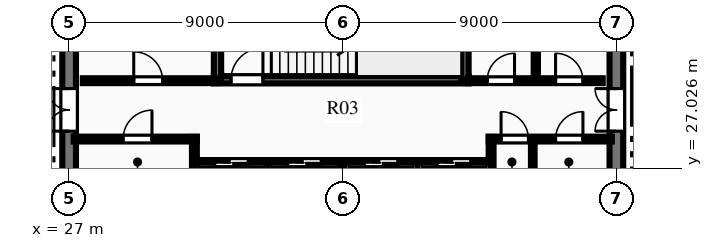
"""IFC4 building model, lengths in metres.
Left out: names, types, materials, properties, quantities, classifications, styles, units other than length and angle.
Written with IfcOpenShell. Run it as: python <this file> out.ifc"""

import sys

from ifc_helpers import new_model, si_unit, direction, frame, frame_2d, origin, place, context, subcontext, project, spatial, rectangle, extrude, element, fill, save


model = new_model("IFC4")
c1 = context("Model", 3, precision=1e-05, world=origin(), true_north=direction((0.0, 1.0)))
c2 = subcontext(c1, "Body", "Model", "MODEL_VIEW")
j1 = project(units=[si_unit("LENGTHUNIT", "METRE"), si_unit("PLANEANGLEUNIT", "RADIAN")], contexts=[c1])
p1 = place(None, origin())
s1 = spatial("IfcSite", under=j1, at=p1, CompositionType="ELEMENT")
p2 = place(p1, origin())
s2 = spatial("IfcBuilding", under=s1, at=p2, CompositionType="ELEMENT")
p3 = place(p2, frame((0.0, 0.0, 263.7)))
s3 = spatial("IfcBuildingStorey", under=s2, at=p3, CompositionType="ELEMENT", Elevation=263.7)
p4 = place(p3, frame((27.0, 18.225, 0.0), z_axis=(0.0, 0.0, 1.0), x_axis=(0.0, 1.0, 0.0)))
e1 = element("IfcWall", 1, at=p4, inside=s3, PredefinedType="SHEAR", context=c2, shape_type="SweptSolid", body=[
    extrude(rectangle(XDim=15.55, YDim=0.45, at=frame_2d((7.775, 0.0))), origin(), (0.0, 0.0, 1.0), 3.75),
])
p5 = place(p4, frame((10.015, 0.0, 0.0)))
e2 = element("IfcOpeningElement", 2, at=p5, cuts=e1, PredefinedType="OPENING", context=c2, shape_type="SweptSolid", body=[
    extrude(rectangle(XDim=1.4, YDim=2.2, at=frame_2d((0.7, 1.1))), frame((0.0, 0.235, 0.0), z_axis=(0.0, -1.0, 0.0), x_axis=(1.0, 0.0, 0.0)), (0.0, 0.0, 1.0), 0.47),
])
p6 = place(p3, frame((45.0, 18.225, 0.0), z_axis=(0.0, 0.0, 1.0), x_axis=(0.0, 1.0, 0.0)))
e3 = element("IfcWall", 3, at=p6, inside=s3, PredefinedType="SHEAR", context=c2, shape_type="SweptSolid", body=[
    extrude(rectangle(XDim=15.55, YDim=0.45, at=frame_2d((7.775, 0.0))), origin(), (0.0, 0.0, 1.0), 3.75),
])
p7 = place(p6, frame((10.015, 0.0, 0.0)))
e4 = element("IfcOpeningElement", 4, at=p7, cuts=e3, PredefinedType="OPENING", context=c2, shape_type="SweptSolid", body=[
    extrude(rectangle(XDim=1.4, YDim=2.2, at=frame_2d((0.7, 1.1))), frame((0.0, 0.235, 0.0), z_axis=(0.0, -1.0, 0.0), x_axis=(1.0, 0.0, 0.0)), (0.0, 0.0, 1.0), 0.47),
])
p8 = place(p3, frame((31.76, 29.93, 0.0), z_axis=(0.0, 0.0, 1.0), x_axis=(1.0, 0.0, 0.0)))
e5 = element("IfcWall", 5, at=p8, inside=s3, PredefinedType="SHEAR", context=c2, shape_type="SweptSolid", body=[
    extrude(rectangle(XDim=8.38, YDim=0.24, at=frame_2d((4.19, 0.0))), origin(), (0.0, 0.0, 1.0), 3.75),
])
p9 = place(p8, frame((0.565, 0.0, 0.0)))
e6 = element("IfcOpeningElement", 6, at=p9, cuts=e5, PredefinedType="OPENING", context=c2, shape_type="SweptSolid", body=[
    extrude(rectangle(XDim=1.05, YDim=2.15, at=frame_2d((0.525, 1.075))), frame((0.0, 0.13, 0.0), z_axis=(0.0, -1.0, 0.0), x_axis=(1.0, 0.0, 0.0)), (0.0, 0.0, 1.0), 0.26),
])
p10 = place(p3, frame((31.88, 29.93, 0.0), z_axis=(0.0, 0.0, 1.0), x_axis=(0.0, 1.0, 0.0)))
e7 = element("IfcWall", 7, at=p10, inside=s3, PredefinedType="SHEAR", context=c2, shape_type="SweptSolid", body=[
    extrude(rectangle(XDim=3.79, YDim=0.24, at=frame_2d((1.895, 0.0))), origin(), (0.0, 0.0, 1.0), 3.75),
])
p11 = place(p3, frame((40.02, 29.93, 0.0), z_axis=(0.0, 0.0, 1.0), x_axis=(0.0, 1.0, 0.0)))
e8 = element("IfcWall", 8, at=p11, inside=s3, PredefinedType="SHEAR", context=c2, shape_type="SweptSolid", body=[
    extrude(rectangle(XDim=3.85, YDim=0.24, at=frame_2d((1.925, 0.0))), origin(), (0.0, 0.0, 1.0), 3.75),
])
p12 = place(p3, frame((27.15, 27.98, 0.0), z_axis=(0.0, 0.0, 1.0), x_axis=(1.0, 0.0, 0.0)))
e9 = element("IfcWall", 9, at=p12, inside=s3, PredefinedType="PARTITIONING", context=c2, shape_type="SweptSolid", body=[
    extrude(rectangle(XDim=4.05, YDim=0.16, at=frame_2d((2.025, 0.0))), origin(), (0.0, 0.0, 1.0), 3.48),
])
p13 = place(p12, frame((1.625, 0.0, 0.0)))
e10 = element("IfcOpeningElement", 10, at=p13, cuts=e9, PredefinedType="OPENING", context=c2, shape_type="SweptSolid", body=[
    extrude(rectangle(XDim=0.95, YDim=2.15, at=frame_2d((0.475, 1.075))), frame((0.0, 0.09, 0.0), z_axis=(0.0, -1.0, 0.0), x_axis=(1.0, 0.0, 0.0)), (0.0, 0.0, 1.0), 0.18),
])
p14 = place(p3, frame((31.12, 26.54, 0.0), z_axis=(0.0, 0.0, 1.0), x_axis=(0.0, 1.0, 0.0)))
e11 = element("IfcWall", 11, at=p14, inside=s3, PredefinedType="PARTITIONING", context=c2, shape_type="SweptSolid", body=[
    extrude(rectangle(XDim=1.51, YDim=0.16, at=frame_2d((0.755, 0.0))), origin(), (0.0, 0.0, 1.0), 3.48),
])
p15 = place(p3, frame((40.8, 27.98, 0.0), z_axis=(0.0, 0.0, 1.0), x_axis=(1.0, 0.0, 0.0)))
e12 = element("IfcWall", 12, at=p15, inside=s3, PredefinedType="PARTITIONING", context=c2, shape_type="SweptSolid", body=[
    extrude(rectangle(XDim=4.05, YDim=0.16, at=frame_2d((2.025, 0.0))), origin(), (0.0, 0.0, 1.0), 3.48),
])
p16 = place(p15, frame((0.407, 0.0, 0.0)))
e13 = element("IfcOpeningElement", 13, at=p16, cuts=e12, PredefinedType="OPENING", context=c2, shape_type="SweptSolid", body=[
    extrude(rectangle(XDim=0.9, YDim=2.15, at=frame_2d((0.45, 1.075))), frame((0.0, 0.09, 0.0), z_axis=(0.0, -1.0, 0.0), x_axis=(1.0, 0.0, 0.0)), (0.0, 0.0, 1.0), 0.18),
])
p17 = place(p15, frame((2.2, 0.0, 0.0)))
e14 = element("IfcOpeningElement", 14, at=p17, cuts=e12, PredefinedType="OPENING", context=c2, shape_type="SweptSolid", body=[
    extrude(rectangle(XDim=0.9, YDim=2.15, at=frame_2d((0.45, 1.075))), frame((0.0, 0.09, 0.0), z_axis=(0.0, -1.0, 0.0), x_axis=(1.0, 0.0, 0.0)), (0.0, 0.0, 1.0), 0.18),
])
p18 = place(p3, frame((40.88, 26.54, 0.0), z_axis=(0.0, 0.0, 1.0), x_axis=(0.0, 1.0, 0.0)))
e15 = element("IfcWall", 15, at=p18, inside=s3, PredefinedType="PARTITIONING", context=c2, shape_type="SweptSolid", body=[
    extrude(rectangle(XDim=1.51, YDim=0.16, at=frame_2d((0.755, 0.0))), origin(), (0.0, 0.0, 1.0), 3.48),
])
p19 = place(p3, frame((42.25, 26.54, 0.0), z_axis=(0.0, 0.0, 1.0), x_axis=(0.0, 1.0, 0.0)))
e16 = element("IfcWall", 16, at=p19, inside=s3, PredefinedType="PARTITIONING", context=c2, shape_type="SweptSolid", body=[
    extrude(rectangle(XDim=1.44, YDim=0.12, at=frame_2d((0.72, 0.0))), origin(), (0.0, 0.0, 1.0), 3.48),
])
p20 = place(p3, frame((27.45, 29.9, 0.0), z_axis=(0.0, 0.0, 1.0), x_axis=(1.0, 0.0, 0.0)))
e17 = element("IfcWall", 17, at=p20, inside=s3, PredefinedType="PARTITIONING", context=c2, shape_type="SweptSolid", body=[
    extrude(rectangle(XDim=4.43, YDim=0.16, at=frame_2d((2.215, 0.0))), origin(), (0.0, 0.0, 1.0), 3.48),
])
p21 = place(p20, frame((1.675, 0.0, 0.0)))
e18 = element("IfcOpeningElement", 18, at=p21, cuts=e17, PredefinedType="OPENING", context=c2, shape_type="SweptSolid", body=[
    extrude(rectangle(XDim=0.95, YDim=2.15, at=frame_2d((0.475, 1.075))), frame((0.0, 0.09, 0.0), z_axis=(0.0, -1.0, 0.0), x_axis=(1.0, 0.0, 0.0)), (0.0, 0.0, 1.0), 0.18),
])
p22 = place(p3, frame((40.12, 29.9, 0.0), z_axis=(0.0, 0.0, 1.0), x_axis=(1.0, 0.0, 0.0)))
e19 = element("IfcWall", 19, at=p22, inside=s3, PredefinedType="PARTITIONING", context=c2, shape_type="SweptSolid", body=[
    extrude(rectangle(XDim=4.43, YDim=0.16, at=frame_2d((2.215, 0.0))), origin(), (0.0, 0.0, 1.0), 3.48),
])
p23 = place(p22, frame((0.63, 0.0, 0.0)))
e20 = element("IfcOpeningElement", 20, at=p23, cuts=e19, PredefinedType="OPENING", context=c2, shape_type="SweptSolid", body=[
    extrude(rectangle(XDim=0.9, YDim=2.15, at=frame_2d((0.45, 1.075))), frame((0.0, 0.09, 0.0), z_axis=(0.0, -1.0, 0.0), x_axis=(1.0, 0.0, 0.0)), (0.0, 0.0, 1.0), 0.18),
])
p24 = place(p22, frame((2.88, 0.0, 0.0)))
e21 = element("IfcOpeningElement", 21, at=p24, cuts=e19, PredefinedType="OPENING", context=c2, shape_type="SweptSolid", body=[
    extrude(rectangle(XDim=0.9, YDim=2.15, at=frame_2d((0.45, 1.075))), frame((0.0, 0.09, 0.0), z_axis=(0.0, -1.0, 0.0), x_axis=(1.0, 0.0, 0.0)), (0.0, 0.0, 1.0), 0.18),
])
p25 = place(p3, frame((42.35, 29.95, 0.0), z_axis=(0.0, 0.0, 1.0), x_axis=(0.0, 1.0, 0.0)))
e22 = element("IfcWall", 22, at=p25, inside=s3, PredefinedType="PARTITIONING", context=c2, shape_type="SweptSolid", body=[
    extrude(rectangle(XDim=3.6, YDim=0.14, at=frame_2d((1.8, 0.0))), origin(), (0.0, 0.0, 1.0), 3.48),
])
p26 = place(p3, frame((31.2, 27.2, 0.0), z_axis=(0.0, 0.0, 1.0), x_axis=(1.0, 0.0, 0.0)))
e23 = element("IfcWall", 23, at=p26, inside=s3, PredefinedType="PARTITIONING", context=c2, shape_type="SweptSolid", body=[
    extrude(rectangle(XDim=9.6, YDim=0.18, at=frame_2d((4.8, 0.0))), origin(), (0.0, 0.0, 1.0), 3.48),
])
p27 = place(p26, frame((0.59, 0.0, 0.0)))
e24 = element("IfcOpeningElement", 24, at=p27, cuts=e23, PredefinedType="OPENING", context=c2, shape_type="SweptSolid", body=[
    extrude(rectangle(XDim=1.1, YDim=2.15, at=frame_2d((0.55, 1.075))), frame((0.0, 0.1, 0.0), z_axis=(0.0, -1.0, 0.0), x_axis=(1.0, 0.0, 0.0)), (0.0, 0.0, 1.0), 0.2),
])
p28 = place(p26, frame((2.99, 0.0, 0.0)))
e25 = element("IfcOpeningElement", 25, at=p28, cuts=e23, PredefinedType="OPENING", context=c2, shape_type="SweptSolid", body=[
    extrude(rectangle(XDim=1.1, YDim=2.15, at=frame_2d((0.55, 1.075))), frame((0.0, 0.1, 0.0), z_axis=(0.0, -1.0, 0.0), x_axis=(1.0, 0.0, 0.0)), (0.0, 0.0, 1.0), 0.2),
])
p29 = place(p26, frame((5.51, 0.0, 0.0)))
e26 = element("IfcOpeningElement", 26, at=p29, cuts=e23, PredefinedType="OPENING", context=c2, shape_type="SweptSolid", body=[
    extrude(rectangle(XDim=1.1, YDim=2.15, at=frame_2d((0.55, 1.075))), frame((0.0, 0.1, 0.0), z_axis=(0.0, -1.0, 0.0), x_axis=(1.0, 0.0, 0.0)), (0.0, 0.0, 1.0), 0.2),
])
p30 = place(p26, frame((7.91, 0.0, 0.0)))
e27 = element("IfcOpeningElement", 27, at=p30, cuts=e23, PredefinedType="OPENING", context=c2, shape_type="SweptSolid", body=[
    extrude(rectangle(XDim=1.1, YDim=2.15, at=frame_2d((0.55, 1.075))), frame((0.0, 0.1, 0.0), z_axis=(0.0, -1.0, 0.0), x_axis=(1.0, 0.0, 0.0)), (0.0, 0.0, 1.0), 0.2),
])
for number, where, z_axis, x_axis in (
    (28, (33.54, 25.3, 0.0), (0.0, 0.0, 1.0), (0.0, 1.0, 0.0)),
    (29, (36.0, 25.3, 0.0), (0.0, 0.0, 1.0), (0.0, 1.0, 0.0)),
    (30, (38.46, 25.3, 0.0), (0.0, 0.0, 1.0), (0.0, 1.0, 0.0)),
):
    element("IfcWall", number, at=place(p3, frame(where, z_axis=z_axis, x_axis=x_axis)), inside=s3, PredefinedType="PARTITIONING", context=c2, shape_type="SweptSolid", body=[
        extrude(rectangle(XDim=1.9, YDim=0.18, at=frame_2d((0.95, 0.0))), origin(), (0.0, 0.0, 1.0), 3.48),
    ])
p31 = place(p13, origin())
e31 = element("IfcDoor", 31, at=p31, inside=s3, OperationType="SINGLE_SWING_RIGHT", PredefinedType="DOOR", context=c2, shape_type="SweptSolid", body=[
    extrude(rectangle(XDim=0.95, YDim=2.15, at=frame_2d((0.475, 1.075))), frame((0.0, 0.025, 0.0), z_axis=(0.0, -1.0, 0.0), x_axis=(1.0, 0.0, 0.0)), (0.0, 0.0, 1.0), 0.05),
])
fill(e10, e31)
p32 = place(p16, origin())
e32 = element("IfcDoor", 32, at=p32, inside=s3, OperationType="SINGLE_SWING_LEFT", PredefinedType="DOOR", context=c2, shape_type="SweptSolid", body=[
    extrude(rectangle(XDim=0.9, YDim=2.15, at=frame_2d((0.45, 1.075))), frame((0.0, 0.025, 0.0), z_axis=(0.0, -1.0, 0.0), x_axis=(1.0, 0.0, 0.0)), (0.0, 0.0, 1.0), 0.05),
])
fill(e13, e32)
p33 = place(p17, origin())
e33 = element("IfcDoor", 33, at=p33, inside=s3, OperationType="SINGLE_SWING_RIGHT", PredefinedType="DOOR", context=c2, shape_type="SweptSolid", body=[
    extrude(rectangle(XDim=0.9, YDim=2.15, at=frame_2d((0.45, 1.075))), frame((0.0, 0.025, 0.0), z_axis=(0.0, -1.0, 0.0), x_axis=(1.0, 0.0, 0.0)), (0.0, 0.0, 1.0), 0.05),
])
fill(e14, e33)
p34 = place(p21, origin())
e34 = element("IfcDoor", 34, at=p34, inside=s3, OperationType="SINGLE_SWING_LEFT", PredefinedType="DOOR", context=c2, shape_type="SweptSolid", body=[
    extrude(rectangle(XDim=0.95, YDim=2.15, at=frame_2d((0.475, 1.075))), frame((0.0, 0.025, 0.0), z_axis=(0.0, -1.0, 0.0), x_axis=(1.0, 0.0, 0.0)), (0.0, 0.0, 1.0), 0.05),
])
fill(e18, e34)
p35 = place(p23, origin())
e35 = element("IfcDoor", 35, at=p35, inside=s3, OperationType="SINGLE_SWING_RIGHT", PredefinedType="DOOR", context=c2, shape_type="SweptSolid", body=[
    extrude(rectangle(XDim=0.9, YDim=2.15, at=frame_2d((0.45, 1.075))), frame((0.0, 0.025, 0.0), z_axis=(0.0, -1.0, 0.0), x_axis=(1.0, 0.0, 0.0)), (0.0, 0.0, 1.0), 0.05),
])
fill(e20, e35)
p36 = place(p24, origin())
e36 = element("IfcDoor", 36, at=p36, inside=s3, OperationType="SINGLE_SWING_LEFT", PredefinedType="DOOR", context=c2, shape_type="SweptSolid", body=[
    extrude(rectangle(XDim=0.9, YDim=2.15, at=frame_2d((0.45, 1.075))), frame((0.0, 0.025, 0.0), z_axis=(0.0, -1.0, 0.0), x_axis=(1.0, 0.0, 0.0)), (0.0, 0.0, 1.0), 0.05),
])
fill(e21, e36)
p37 = place(p9, origin())
e37 = element("IfcDoor", 37, at=p37, inside=s3, OperationType="SINGLE_SWING_RIGHT", PredefinedType="DOOR", context=c2, shape_type="SweptSolid", body=[
    extrude(rectangle(XDim=1.05, YDim=2.15, at=frame_2d((0.525, 1.075))), frame((0.0, 0.025, 0.0), z_axis=(0.0, -1.0, 0.0), x_axis=(1.0, 0.0, 0.0)), (0.0, 0.0, 1.0), 0.05),
])
fill(e6, e37)
p38 = place(p5, origin())
e38 = element("IfcDoor", 38, at=p38, inside=s3, OperationType="DOUBLE_DOOR_SINGLE_SWING", PredefinedType="DOOR", context=c2, shape_type="SweptSolid", body=[
    extrude(rectangle(XDim=1.4, YDim=2.2, at=frame_2d((0.7, 1.1))), frame((0.0, 0.025, 0.0), z_axis=(0.0, -1.0, 0.0), x_axis=(1.0, 0.0, 0.0)), (0.0, 0.0, 1.0), 0.05),
])
fill(e2, e38)
p39 = place(p7, origin())
e39 = element("IfcDoor", 39, at=p39, inside=s3, OperationType="DOUBLE_DOOR_SINGLE_SWING", PredefinedType="DOOR", context=c2, shape_type="SweptSolid", body=[
    extrude(rectangle(XDim=1.4, YDim=2.2, at=frame_2d((0.7, 1.1))), frame((0.0, 0.025, 0.0), z_axis=(0.0, -1.0, 0.0), x_axis=(1.0, 0.0, 0.0)), (0.0, 0.0, 1.0), 0.05),
])
fill(e4, e39)
p40 = place(p27, origin())
e40 = element("IfcDoor", 40, at=p40, inside=s3, OperationType="SLIDING_TO_LEFT", PredefinedType="DOOR", context=c2, shape_type="SweptSolid", body=[
    extrude(rectangle(XDim=1.1, YDim=2.15, at=frame_2d((0.55, 1.075))), frame((0.0, 0.025, 0.0), z_axis=(0.0, -1.0, 0.0), x_axis=(1.0, 0.0, 0.0)), (0.0, 0.0, 1.0), 0.05),
])
fill(e24, e40)
p41 = place(p28, origin())
e41 = element("IfcDoor", 41, at=p41, inside=s3, OperationType="SLIDING_TO_LEFT", PredefinedType="DOOR", context=c2, shape_type="SweptSolid", body=[
    extrude(rectangle(XDim=1.1, YDim=2.15, at=frame_2d((0.55, 1.075))), frame((0.0, 0.025, 0.0), z_axis=(0.0, -1.0, 0.0), x_axis=(1.0, 0.0, 0.0)), (0.0, 0.0, 1.0), 0.05),
])
fill(e25, e41)
p42 = place(p29, origin())
e42 = element("IfcDoor", 42, at=p42, inside=s3, OperationType="SLIDING_TO_LEFT", PredefinedType="DOOR", context=c2, shape_type="SweptSolid", body=[
    extrude(rectangle(XDim=1.1, YDim=2.15, at=frame_2d((0.55, 1.075))), frame((0.0, 0.025, 0.0), z_axis=(0.0, -1.0, 0.0), x_axis=(1.0, 0.0, 0.0)), (0.0, 0.0, 1.0), 0.05),
])
fill(e26, e42)
p43 = place(p30, origin())
e43 = element("IfcDoor", 43, at=p43, inside=s3, OperationType="SLIDING_TO_LEFT", PredefinedType="DOOR", context=c2, shape_type="SweptSolid", body=[
    extrude(rectangle(XDim=1.1, YDim=2.15, at=frame_2d((0.55, 1.075))), frame((0.0, 0.025, 0.0), z_axis=(0.0, -1.0, 0.0), x_axis=(1.0, 0.0, 0.0)), (0.0, 0.0, 1.0), 0.05),
])
fill(e27, e43)
save(model, sys.argv[1])
